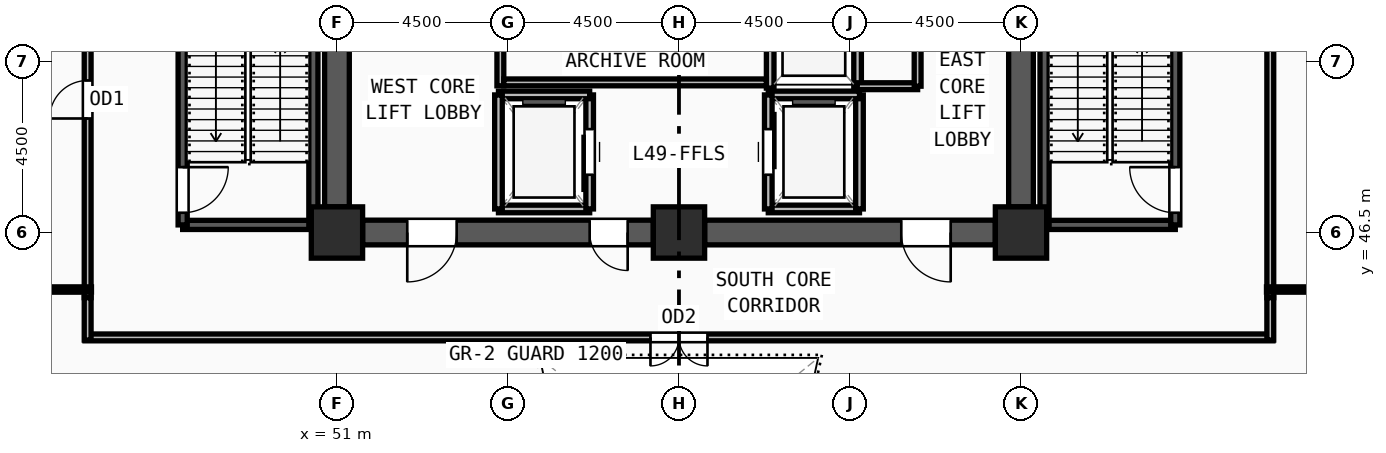
"""IFC4 building model, lengths in metres.
Left out: names, types, materials, properties, quantities, classifications, styles, units other than length and angle.
Written with IfcOpenShell. Run it as: python <this file> out.ifc"""

import sys

from ifc_helpers import new_model, si_unit, direction, frame, frame_2d, origin, origin_2d, place, context, subcontext, project, spatial, rectangle, extrude, source, transform, mapped, element, fill, save


model = new_model("IFC4")
c1 = context("Model", 3, precision=1e-05, world=origin(), true_north=direction((0.0, 1.0)))
c2 = subcontext(c1, "Body", "Model", "MODEL_VIEW")
j1 = project(units=[si_unit("LENGTHUNIT", "METRE"), si_unit("PLANEANGLEUNIT", "RADIAN")], contexts=[c1])
p1 = place(None, origin())
s1 = spatial("IfcSite", under=j1, at=p1, CompositionType="ELEMENT")
p2 = place(p1, origin())
s2 = spatial("IfcBuilding", under=s1, at=p2, CompositionType="ELEMENT")
p3 = place(p2, frame((0.0, 0.0, 189.75)))
s3 = spatial("IfcBuildingStorey", under=s2, at=p3, CompositionType="ELEMENT", Elevation=189.75)
m1 = source(origin(), c2, "Body", "SweptSolid", [
    extrude(rectangle(XDim=1.35, YDim=1.35, at=origin_2d()), origin(), (0.0, 0.0, 1.0), 4.5),
])
for number, where, z_axis, x_axis in (
    (1, (51.0, 46.5, 0.0), (0.0, 0.0, 1.0), (1.0, 0.0, 0.0)),
    (2, (60.0, 46.5, 0.0), (0.0, 0.0, 1.0), (1.0, 0.0, 0.0)),
    (3, (69.0, 46.5, 0.0), (0.0, 0.0, 1.0), (1.0, 0.0, 0.0)),
):
    element("IfcColumn", number, at=place(p3, frame(where, z_axis=z_axis, x_axis=x_axis)), inside=s3, PredefinedType="COLUMN", context=c2, shape_type="MappedRepresentation", body=[
        mapped(m1, transform((0.0, 0.0, 0.0), x_axis=(1.0, 0.0, 0.0), y_axis=(0.0, 1.0, 0.0), z_axis=(0.0, 0.0, 1.0), scale=1.0)),
    ])
p4 = place(p3, frame((37.541, 43.351, 0.0), z_axis=(0.0, 0.0, 1.0), x_axis=(0.551962660992, -0.833868827137, 0.0)))
e4 = element("IfcWall", 4, at=p4, inside=s3, PredefinedType="SOLIDWALL", context=c2, shape_type="SweptSolid", body=[
    extrude(rectangle(XDim=11.785, YDim=0.38, at=frame_2d((5.893, 0.0))), origin(), (0.0, 0.0, 1.0), 4.32),
])
p5 = place(p3, frame((69.0, 60.825, 0.0), z_axis=(0.0, 0.0, 1.0), x_axis=(0.0, -1.0, 0.0)))
e5 = element("IfcWall", 5, at=p5, inside=s3, PredefinedType="SHEAR", context=c2, shape_type="SweptSolid", body=[
    extrude(rectangle(XDim=13.65, YDim=0.65, at=frame_2d((6.825, 0.0))), origin(), (0.0, 0.0, 1.0), 4.32),
])
m2 = source(origin(), c2, "Body", "SweptSolid", [
    extrude(rectangle(XDim=1.2, YDim=2.2, at=frame_2d((0.6, 1.1))), frame((0.0, 0.335, 0.0), z_axis=(0.0, -1.0, 0.0), x_axis=(1.0, 0.0, 0.0)), (0.0, 0.0, 1.0), 0.67),
])
p6 = place(p5, frame((1.275, 0.0, 0.0)))
e6 = element("IfcOpeningElement", 6, at=p6, cuts=e5, PredefinedType="OPENING", context=c2, shape_type="MappedRepresentation", body=[
    mapped(m2, transform((0.0, 0.0, 0.0), x_axis=(1.0, 0.0, 0.0), y_axis=(0.0, 1.0, 0.0), z_axis=(0.0, 0.0, 1.0), scale=1.0)),
])
p7 = place(p3, frame((68.325, 46.5, 0.0), z_axis=(0.0, 0.0, 1.0), x_axis=(-1.0, 0.0, 0.0)))
e7 = element("IfcWall", 7, at=p7, inside=s3, PredefinedType="SHEAR", context=c2, shape_type="SweptSolid", body=[
    extrude(rectangle(XDim=7.65, YDim=0.65, at=frame_2d((3.825, 0.0))), origin(), (0.0, 0.0, 1.0), 4.32),
])
m3 = source(origin(), c2, "Body", "SweptSolid", [
    extrude(rectangle(XDim=1.3, YDim=2.2, at=frame_2d((0.65, 1.1))), frame((0.0, 0.335, 0.0), z_axis=(0.0, -1.0, 0.0), x_axis=(1.0, 0.0, 0.0)), (0.0, 0.0, 1.0), 0.67),
])
p8 = place(p7, frame((1.175, 0.0, 0.0)))
e8 = element("IfcOpeningElement", 8, at=p8, cuts=e7, PredefinedType="OPENING", context=c2, shape_type="MappedRepresentation", body=[
    mapped(m3, transform((0.0, 0.0, 0.0), x_axis=(1.0, 0.0, 0.0), y_axis=(0.0, 1.0, 0.0), z_axis=(0.0, 0.0, 1.0), scale=1.0)),
])
p9 = place(p3, frame((59.325, 46.5, 0.0), z_axis=(0.0, 0.0, 1.0), x_axis=(-1.0, 0.0, 0.0)))
e9 = element("IfcWall", 9, at=p9, inside=s3, PredefinedType="SHEAR", context=c2, shape_type="SweptSolid", body=[
    extrude(rectangle(XDim=7.65, YDim=0.65, at=frame_2d((3.825, 0.0))), origin(), (0.0, 0.0, 1.0), 4.32),
])
p10 = place(p9, frame((5.175, 0.0, 0.0)))
e10 = element("IfcOpeningElement", 10, at=p10, cuts=e9, PredefinedType="OPENING", context=c2, shape_type="MappedRepresentation", body=[
    mapped(m3, transform((0.0, 0.0, 0.0), x_axis=(1.0, 0.0, 0.0), y_axis=(0.0, 1.0, 0.0), z_axis=(0.0, 0.0, 1.0), scale=1.0)),
])
m4 = source(origin(), c2, "Body", "SweptSolid", [
    extrude(rectangle(XDim=1.0, YDim=2.2, at=frame_2d((0.5, 1.1))), frame((0.0, 0.335, 0.0), z_axis=(0.0, -1.0, 0.0), x_axis=(1.0, 0.0, 0.0)), (0.0, 0.0, 1.0), 0.67),
])
p11 = place(p9, frame((0.675, 0.0, 0.0)))
e11 = element("IfcOpeningElement", 11, at=p11, cuts=e9, PredefinedType="OPENING", context=c2, shape_type="MappedRepresentation", body=[
    mapped(m4, transform((0.0, 0.0, 0.0), x_axis=(1.0, 0.0, 0.0), y_axis=(0.0, 1.0, 0.0), z_axis=(0.0, 0.0, 1.0), scale=1.0)),
])
p12 = place(p3, frame((51.0, 47.175, 0.0), z_axis=(0.0, 0.0, 1.0), x_axis=(0.0, 1.0, 0.0)))
e12 = element("IfcWall", 12, at=p12, inside=s3, PredefinedType="SHEAR", context=c2, shape_type="SweptSolid", body=[
    extrude(rectangle(XDim=13.65, YDim=0.65, at=frame_2d((6.825, 0.0))), origin(), (0.0, 0.0, 1.0), 4.32),
])
m5 = source(origin(), c2, "Body", "SweptSolid", [
    extrude(rectangle(XDim=1.1, YDim=2.2, at=frame_2d((0.55, 1.1))), frame((0.0, 0.335, 0.0), z_axis=(0.0, -1.0, 0.0), x_axis=(1.0, 0.0, 0.0)), (0.0, 0.0, 1.0), 0.67),
])
p13 = place(p12, frame((11.725, 0.0, 0.0)))
e13 = element("IfcOpeningElement", 13, at=p13, cuts=e12, PredefinedType="OPENING", context=c2, shape_type="MappedRepresentation", body=[
    mapped(m5, transform((0.0, 0.0, 0.0), x_axis=(1.0, 0.0, 0.0), y_axis=(0.0, 1.0, 0.0), z_axis=(0.0, 0.0, 1.0), scale=1.0)),
])
p14 = place(p3, frame((46.94, 46.7, 0.0), z_axis=(0.0, 0.0, 1.0), x_axis=(1.0, 0.0, 0.0)))
e14 = element("IfcWall", 14, at=p14, inside=s3, PredefinedType="SOLIDWALL", context=c2, shape_type="SweptSolid", body=[
    extrude(rectangle(XDim=3.44, YDim=0.24, at=frame_2d((1.72, 0.0))), origin(), (0.0, 0.0, 1.0), 4.32),
])
p15 = place(p3, frame((50.38, 46.7, 0.0), z_axis=(0.0, 0.0, 1.0), x_axis=(0.0, 1.0, 0.0)))
e15 = element("IfcWall", 15, at=p15, inside=s3, PredefinedType="SOLIDWALL", context=c2, shape_type="SweptSolid", body=[
    extrude(rectangle(XDim=7.82, YDim=0.24, at=frame_2d((3.91, 0.0))), origin(), (0.0, 0.0, 1.0), 4.32),
])
p16 = place(p3, frame((46.94, 54.52, 0.0), z_axis=(0.0, 0.0, 1.0), x_axis=(0.0, -1.0, 0.0)))
e16 = element("IfcWall", 16, at=p16, inside=s3, PredefinedType="SOLIDWALL", context=c2, shape_type="SweptSolid", body=[
    extrude(rectangle(XDim=7.82, YDim=0.24, at=frame_2d((3.91, 0.0))), origin(), (0.0, 0.0, 1.0), 4.32),
])
m6 = source(origin(), c2, "Body", "SweptSolid", [
    extrude(rectangle(XDim=1.2, YDim=2.2, at=frame_2d((0.6, 1.1))), frame((0.0, 0.13, 0.0), z_axis=(0.0, -1.0, 0.0), x_axis=(1.0, 0.0, 0.0)), (0.0, 0.0, 1.0), 0.26),
])
p17 = place(p16, frame((6.3, 0.0, 0.0)))
e17 = element("IfcOpeningElement", 17, at=p17, cuts=e16, PredefinedType="OPENING", context=c2, shape_type="MappedRepresentation", body=[
    mapped(m6, transform((0.0, 0.0, 0.0), x_axis=(1.0, 0.0, 0.0), y_axis=(0.0, 1.0, 0.0), z_axis=(0.0, 0.0, 1.0), scale=1.0)),
])
p18 = place(p3, frame((69.62, 46.7, 0.0), z_axis=(0.0, 0.0, 1.0), x_axis=(1.0, 0.0, 0.0)))
e18 = element("IfcWall", 18, at=p18, inside=s3, PredefinedType="SOLIDWALL", context=c2, shape_type="SweptSolid", body=[
    extrude(rectangle(XDim=3.44, YDim=0.24, at=frame_2d((1.72, 0.0))), origin(), (0.0, 0.0, 1.0), 4.32),
])
p19 = place(p3, frame((73.06, 46.7, 0.0), z_axis=(0.0, 0.0, 1.0), x_axis=(0.0, 1.0, 0.0)))
e19 = element("IfcWall", 19, at=p19, inside=s3, PredefinedType="SOLIDWALL", context=c2, shape_type="SweptSolid", body=[
    extrude(rectangle(XDim=7.82, YDim=0.24, at=frame_2d((3.91, 0.0))), origin(), (0.0, 0.0, 1.0), 4.32),
])
p20 = place(p19, frame((0.32, 0.0, 0.0)))
e20 = element("IfcOpeningElement", 20, at=p20, cuts=e19, PredefinedType="OPENING", context=c2, shape_type="MappedRepresentation", body=[
    mapped(m6, transform((0.0, 0.0, 0.0), x_axis=(1.0, 0.0, 0.0), y_axis=(0.0, 1.0, 0.0), z_axis=(0.0, 0.0, 1.0), scale=1.0)),
])
p21 = place(p3, frame((69.62, 54.52, 0.0), z_axis=(0.0, 0.0, 1.0), x_axis=(0.0, -1.0, 0.0)))
e21 = element("IfcWall", 21, at=p21, inside=s3, PredefinedType="SOLIDWALL", context=c2, shape_type="SweptSolid", body=[
    extrude(rectangle(XDim=7.82, YDim=0.24, at=frame_2d((3.91, 0.0))), origin(), (0.0, 0.0, 1.0), 4.32),
])
p22 = place(p3, frame((55.25, 47.12, 0.0), z_axis=(0.0, 0.0, 1.0), x_axis=(1.0, 0.0, 0.0)))
e22 = element("IfcWall", 22, at=p22, inside=s3, PredefinedType="SOLIDWALL", context=c2, shape_type="SweptSolid", body=[
    extrude(rectangle(XDim=2.4, YDim=0.2, at=frame_2d((1.2, 0.0))), origin(), (0.0, 0.0, 1.0), 4.32),
])
p23 = place(p3, frame((57.65, 47.12, 0.0), z_axis=(0.0, 0.0, 1.0), x_axis=(0.0, 1.0, 0.0)))
e23 = element("IfcWall", 23, at=p23, inside=s3, PredefinedType="SOLIDWALL", context=c2, shape_type="SweptSolid", body=[
    extrude(rectangle(XDim=3.0, YDim=0.2, at=frame_2d((1.5, 0.0))), origin(), (0.0, 0.0, 1.0), 4.32),
])
m7 = source(origin(), c2, "Body", "SweptSolid", [
    extrude(rectangle(XDim=1.2, YDim=2.3, at=frame_2d((0.6, 1.15))), frame((0.0, 0.11, 0.0), z_axis=(0.0, -1.0, 0.0), x_axis=(1.0, 0.0, 0.0)), (0.0, 0.0, 1.0), 0.22),
])
p24 = place(p23, frame((0.9, 0.0, 0.0)))
e24 = element("IfcOpeningElement", 24, at=p24, cuts=e23, PredefinedType="OPENING", context=c2, shape_type="MappedRepresentation", body=[
    mapped(m7, transform((0.0, 0.0, 0.0), x_axis=(1.0, 0.0, 0.0), y_axis=(0.0, 1.0, 0.0), z_axis=(0.0, 0.0, 1.0), scale=1.0)),
])
p25 = place(p3, frame((57.65, 50.12, 0.0), z_axis=(0.0, 0.0, 1.0), x_axis=(-1.0, 0.0, 0.0)))
e25 = element("IfcWall", 25, at=p25, inside=s3, PredefinedType="SOLIDWALL", context=c2, shape_type="SweptSolid", body=[
    extrude(rectangle(XDim=2.4, YDim=0.2, at=frame_2d((1.2, 0.0))), origin(), (0.0, 0.0, 1.0), 4.32),
])
p26 = place(p3, frame((55.25, 50.12, 0.0), z_axis=(0.0, 0.0, 1.0), x_axis=(0.0, -1.0, 0.0)))
e26 = element("IfcWall", 26, at=p26, inside=s3, PredefinedType="SOLIDWALL", context=c2, shape_type="SweptSolid", body=[
    extrude(rectangle(XDim=3.0, YDim=0.2, at=frame_2d((1.5, 0.0))), origin(), (0.0, 0.0, 1.0), 4.32),
])
p27 = place(p3, frame((62.35, 47.12, 0.0), z_axis=(0.0, 0.0, 1.0), x_axis=(1.0, 0.0, 0.0)))
e27 = element("IfcWall", 27, at=p27, inside=s3, PredefinedType="SOLIDWALL", context=c2, shape_type="SweptSolid", body=[
    extrude(rectangle(XDim=2.4, YDim=0.2, at=frame_2d((1.2, 0.0))), origin(), (0.0, 0.0, 1.0), 4.32),
])
p28 = place(p3, frame((64.75, 47.12, 0.0), z_axis=(0.0, 0.0, 1.0), x_axis=(0.0, 1.0, 0.0)))
e28 = element("IfcWall", 28, at=p28, inside=s3, PredefinedType="SOLIDWALL", context=c2, shape_type="SweptSolid", body=[
    extrude(rectangle(XDim=3.0, YDim=0.2, at=frame_2d((1.5, 0.0))), origin(), (0.0, 0.0, 1.0), 4.32),
])
p29 = place(p3, frame((64.75, 50.12, 0.0), z_axis=(0.0, 0.0, 1.0), x_axis=(-1.0, 0.0, 0.0)))
e29 = element("IfcWall", 29, at=p29, inside=s3, PredefinedType="SOLIDWALL", context=c2, shape_type="SweptSolid", body=[
    extrude(rectangle(XDim=2.4, YDim=0.2, at=frame_2d((1.2, 0.0))), origin(), (0.0, 0.0, 1.0), 4.32),
])
p30 = place(p3, frame((62.35, 50.12, 0.0), z_axis=(0.0, 0.0, 1.0), x_axis=(0.0, -1.0, 0.0)))
e30 = element("IfcWall", 30, at=p30, inside=s3, PredefinedType="SOLIDWALL", context=c2, shape_type="SweptSolid", body=[
    extrude(rectangle(XDim=3.0, YDim=0.2, at=frame_2d((1.5, 0.0))), origin(), (0.0, 0.0, 1.0), 4.32),
])
p31 = place(p30, frame((0.9, 0.0, 0.0)))
e31 = element("IfcOpeningElement", 31, at=p31, cuts=e30, PredefinedType="OPENING", context=c2, shape_type="MappedRepresentation", body=[
    mapped(m7, transform((0.0, 0.0, 0.0), x_axis=(1.0, 0.0, 0.0), y_axis=(0.0, 1.0, 0.0), z_axis=(0.0, 0.0, 1.0), scale=1.0)),
])
for number, where, z_axis, x_axis in (
    (32, (64.7, 50.3, 0.0), (0.0, 0.0, 1.0), (0.0, 1.0, 0.0)),
    (33, (62.4, 52.9, 0.0), (0.0, 0.0, 1.0), (0.0, -1.0, 0.0)),
):
    element("IfcWall", number, at=place(p3, frame(where, z_axis=z_axis, x_axis=x_axis)), inside=s3, PredefinedType="SOLIDWALL", context=c2, shape_type="SweptSolid", body=[
        extrude(rectangle(XDim=2.6, YDim=0.2, at=frame_2d((1.3, 0.0))), origin(), (0.0, 0.0, 1.0), 4.32),
    ])
p32 = place(p3, frame((75.56, 65.715, 0.0), z_axis=(0.0, 0.0, 1.0), x_axis=(0.0, -1.0, 0.0)))
e34 = element("IfcWall", 34, at=p32, inside=s3, PredefinedType="PARTITIONING", context=c2, shape_type="SweptSolid", body=[
    extrude(rectangle(XDim=20.93, YDim=0.18, at=frame_2d((10.465, 0.0))), origin(), (0.0, 0.0, 1.0), 4.32),
])
m8 = source(origin(), c2, "Body", "SweptSolid", [
    extrude(rectangle(XDim=1.5, YDim=2.2, at=frame_2d((0.75, 1.1))), frame((0.0, 0.1, 0.0), z_axis=(0.0, -1.0, 0.0), x_axis=(1.0, 0.0, 0.0)), (0.0, 0.0, 1.0), 0.2),
])
p33 = place(p32, frame((9.715, 0.0, 0.0)))
e35 = element("IfcOpeningElement", 35, at=p33, cuts=e34, PredefinedType="OPENING", context=c2, shape_type="MappedRepresentation", body=[
    mapped(m8, transform((0.0, 0.0, 0.0), x_axis=(1.0, 0.0, 0.0), y_axis=(0.0, 1.0, 0.0), z_axis=(0.0, 0.0, 1.0), scale=1.0)),
])
p34 = place(p3, frame((44.44, 44.785, 0.0), z_axis=(0.0, 0.0, 1.0), x_axis=(0.0, 1.0, 0.0)))
e36 = element("IfcWall", 36, at=p34, inside=s3, PredefinedType="PARTITIONING", context=c2, shape_type="SweptSolid", body=[
    extrude(rectangle(XDim=10.43, YDim=0.18, at=frame_2d((5.215, 0.0))), origin(), (0.0, 0.0, 1.0), 3.955),
])
m9 = source(origin(), c2, "Body", "SweptSolid", [
    extrude(rectangle(XDim=1.0, YDim=2.2, at=frame_2d((0.5, 1.1))), frame((0.0, 0.1, 0.0), z_axis=(0.0, -1.0, 0.0), x_axis=(1.0, 0.0, 0.0)), (0.0, 0.0, 1.0), 0.2),
])
p35 = place(p34, frame((4.715, 0.0, 0.0)))
e37 = element("IfcOpeningElement", 37, at=p35, cuts=e36, PredefinedType="OPENING", context=c2, shape_type="MappedRepresentation", body=[
    mapped(m9, transform((0.0, 0.0, 0.0), x_axis=(1.0, 0.0, 0.0), y_axis=(0.0, 1.0, 0.0), z_axis=(0.0, 0.0, 1.0), scale=1.0)),
])
p36 = place(p3, frame((75.63, 43.74, 0.0), z_axis=(0.0, 0.0, 1.0), x_axis=(-1.0, 0.0, 0.0)))
e38 = element("IfcWall", 38, at=p36, inside=s3, PredefinedType="PARTITIONING", context=c2, shape_type="SweptSolid", body=[
    extrude(rectangle(XDim=31.26, YDim=0.18, at=frame_2d((15.63, 0.0))), origin(), (0.0, 0.0, 1.0), 4.32),
])
p37 = place(p36, frame((14.88, 0.0, 0.0)))
e39 = element("IfcOpeningElement", 39, at=p37, cuts=e38, PredefinedType="OPENING", context=c2, shape_type="MappedRepresentation", body=[
    mapped(m8, transform((0.0, 0.0, 0.0), x_axis=(1.0, 0.0, 0.0), y_axis=(0.0, 1.0, 0.0), z_axis=(0.0, 0.0, 1.0), scale=1.0)),
])
p38 = place(p3, frame((64.69, 50.35, 0.0), z_axis=(0.0, 0.0, 1.0), x_axis=(1.0, 0.0, 0.0)))
e40 = element("IfcWall", 40, at=p38, inside=s3, PredefinedType="PARTITIONING", context=c2, shape_type="SweptSolid", body=[
    extrude(rectangle(XDim=1.59, YDim=0.18, at=frame_2d((0.795, 0.0))), origin(), (0.0, 0.0, 1.0), 4.32),
])
p39 = place(p3, frame((66.28, 50.35, 0.0), z_axis=(0.0, 0.0, 1.0), x_axis=(0.0, 1.0, 0.0)))
e41 = element("IfcWall", 41, at=p39, inside=s3, PredefinedType="PARTITIONING", context=c2, shape_type="SweptSolid", body=[
    extrude(rectangle(XDim=2.57, YDim=0.18, at=frame_2d((1.285, 0.0))), origin(), (0.0, 0.0, 1.0), 4.32),
])
for number, where, z_axis, x_axis in (
    (42, (44.44, 43.67, 0.0), (0.0, 0.0, 1.0), (0.0, 1.0, 0.0)),
    (43, (75.56, 44.785, 0.0), (0.0, 0.0, 1.0), (0.0, -1.0, 0.0)),
):
    element("IfcWall", number, at=place(p3, frame(where, z_axis=z_axis, x_axis=x_axis)), inside=s3, PredefinedType="PARTITIONING", context=c2, shape_type="SweptSolid", body=[
        extrude(rectangle(XDim=1.115, YDim=0.18, at=frame_2d((0.558, 0.0))), origin(), (0.0, 0.0, 1.0), 4.32),
    ])
p40 = place(p3, frame((44.54, 45.0, 0.0), z_axis=(0.0, 0.0, 1.0), x_axis=(-1.0, 0.0, 0.0)))
e44 = element("IfcWall", 44, at=p40, inside=s3, PredefinedType="PARTITIONING", context=c2, shape_type="SweptSolid", body=[
    extrude(rectangle(XDim=8.587, YDim=0.14, at=frame_2d((4.293, 0.0))), origin(), (0.0, 0.0, 1.0), 4.32),
])
p41 = place(p3, frame((75.46, 45.0, 0.0), z_axis=(0.0, 0.0, 1.0), x_axis=(1.0, 0.0, 0.0)))
e45 = element("IfcWall", 45, at=p41, inside=s3, PredefinedType="PARTITIONING", context=c2, shape_type="SweptSolid", body=[
    extrude(rectangle(XDim=8.251, YDim=0.14, at=frame_2d((4.125, 0.0))), origin(), (0.0, 0.0, 1.0), 4.32),
])
p42 = place(p3, frame((55.3, 50.36, 0.0), z_axis=(0.0, 0.0, 1.0), x_axis=(0.0, 1.0, 0.0)))
e46 = element("IfcWall", 46, at=p42, inside=s3, PredefinedType="PARTITIONING", context=c2, shape_type="SweptSolid", body=[
    extrude(rectangle(XDim=2.65, YDim=0.18, at=frame_2d((1.325, 0.0))), origin(), (0.0, 0.0, 1.0), 4.32),
])
p43 = place(p3, frame((55.39, 50.45, 0.0), z_axis=(0.0, 0.0, 1.0), x_axis=(1.0, 0.0, 0.0)))
e47 = element("IfcWall", 47, at=p43, inside=s3, PredefinedType="PARTITIONING", context=c2, shape_type="SweptSolid", body=[
    extrude(rectangle(XDim=6.91, YDim=0.18, at=frame_2d((3.455, 0.0))), origin(), (0.0, 0.0, 1.0), 4.32),
])
m10 = source(origin(), c2, "Body", "SweptSolid", [
    extrude(rectangle(XDim=1.3, YDim=2.2, at=frame_2d((0.65, 1.1))), frame((0.0, 0.025, 0.0), z_axis=(0.0, -1.0, 0.0), x_axis=(1.0, 0.0, 0.0)), (0.0, 0.0, 1.0), 0.05),
])
p44 = place(p10, origin())
e48 = element("IfcDoor", 48, at=p44, inside=s3, OperationType="SINGLE_SWING_RIGHT", PredefinedType="DOOR", context=c2, shape_type="MappedRepresentation", body=[
    mapped(m10, transform((0.0, 0.0, 0.0), x_axis=(1.0, 0.0, 0.0), y_axis=(0.0, 1.0, 0.0), z_axis=(0.0, 0.0, 1.0), scale=1.0)),
])
fill(e10, e48)
m11 = source(origin(), c2, "Body", "SweptSolid", [
    extrude(rectangle(XDim=1.0, YDim=2.2, at=frame_2d((0.5, 1.1))), frame((0.0, 0.025, 0.0), z_axis=(0.0, -1.0, 0.0), x_axis=(1.0, 0.0, 0.0)), (0.0, 0.0, 1.0), 0.05),
])
p45 = place(p11, origin())
e49 = element("IfcDoor", 49, at=p45, inside=s3, OperationType="SINGLE_SWING_LEFT", PredefinedType="DOOR", context=c2, shape_type="MappedRepresentation", body=[
    mapped(m11, transform((0.0, 0.0, 0.0), x_axis=(1.0, 0.0, 0.0), y_axis=(0.0, 1.0, 0.0), z_axis=(0.0, 0.0, 1.0), scale=1.0)),
])
fill(e11, e49)
p46 = place(p8, origin())
e50 = element("IfcDoor", 50, at=p46, inside=s3, OperationType="SINGLE_SWING_LEFT", PredefinedType="DOOR", context=c2, shape_type="MappedRepresentation", body=[
    mapped(m10, transform((0.0, 0.0, 0.0), x_axis=(1.0, 0.0, 0.0), y_axis=(0.0, 1.0, 0.0), z_axis=(0.0, 0.0, 1.0), scale=1.0)),
])
fill(e8, e50)
m12 = source(origin(), c2, "Body", "SweptSolid", [
    extrude(rectangle(XDim=1.2, YDim=2.2, at=frame_2d((0.6, 1.1))), frame((0.0, 0.025, 0.0), z_axis=(0.0, -1.0, 0.0), x_axis=(1.0, 0.0, 0.0)), (0.0, 0.0, 1.0), 0.05),
])
p47 = place(p17, origin())
e51 = element("IfcDoor", 51, at=p47, inside=s3, OperationType="SINGLE_SWING_LEFT", PredefinedType="DOOR", context=c2, shape_type="MappedRepresentation", body=[
    mapped(m12, transform((0.0, 0.0, 0.0), x_axis=(1.0, 0.0, 0.0), y_axis=(0.0, 1.0, 0.0), z_axis=(0.0, 0.0, 1.0), scale=1.0)),
])
fill(e17, e51)
p48 = place(p20, origin())
e52 = element("IfcDoor", 52, at=p48, inside=s3, OperationType="SINGLE_SWING_RIGHT", PredefinedType="DOOR", context=c2, shape_type="MappedRepresentation", body=[
    mapped(m12, transform((0.0, 0.0, 0.0), x_axis=(1.0, 0.0, 0.0), y_axis=(0.0, 1.0, 0.0), z_axis=(0.0, 0.0, 1.0), scale=1.0)),
])
fill(e20, e52)
m13 = source(origin(), c2, "Body", "SweptSolid", [
    extrude(rectangle(XDim=1.2, YDim=2.3, at=frame_2d((0.6, 1.15))), frame((0.0, 0.025, 0.0), z_axis=(0.0, -1.0, 0.0), x_axis=(1.0, 0.0, 0.0)), (0.0, 0.0, 1.0), 0.05),
])
p49 = place(p24, origin())
e53 = element("IfcDoor", 53, at=p49, inside=s3, OperationType="SLIDING_TO_LEFT", PredefinedType="DOOR", context=c2, shape_type="MappedRepresentation", body=[
    mapped(m13, transform((0.0, 0.0, 0.0), x_axis=(1.0, 0.0, 0.0), y_axis=(0.0, 1.0, 0.0), z_axis=(0.0, 0.0, 1.0), scale=1.0)),
])
fill(e24, e53)
p50 = place(p31, origin())
e54 = element("IfcDoor", 54, at=p50, inside=s3, OperationType="SLIDING_TO_LEFT", PredefinedType="DOOR", context=c2, shape_type="MappedRepresentation", body=[
    mapped(m13, transform((0.0, 0.0, 0.0), x_axis=(1.0, 0.0, 0.0), y_axis=(0.0, 1.0, 0.0), z_axis=(0.0, 0.0, 1.0), scale=1.0)),
])
fill(e31, e54)
p51 = place(p35, origin())
e55 = element("IfcDoor", 55, at=p51, inside=s3, OperationType="SINGLE_SWING_LEFT", PredefinedType="DOOR", context=c2, shape_type="MappedRepresentation", body=[
    mapped(m11, transform((0.0, 0.0, 0.0), x_axis=(1.0, 0.0, 0.0), y_axis=(0.0, 1.0, 0.0), z_axis=(0.0, 0.0, 1.0), scale=1.0)),
])
fill(e37, e55)
m14 = source(origin(), c2, "Body", "SweptSolid", [
    extrude(rectangle(XDim=1.5, YDim=2.2, at=frame_2d((0.75, 1.1))), frame((0.0, 0.025, 0.0), z_axis=(0.0, -1.0, 0.0), x_axis=(1.0, 0.0, 0.0)), (0.0, 0.0, 1.0), 0.05),
])
p52 = place(p37, origin())
e56 = element("IfcDoor", 56, at=p52, inside=s3, OperationType="DOUBLE_DOOR_SINGLE_SWING", PredefinedType="DOOR", context=c2, shape_type="MappedRepresentation", body=[
    mapped(m14, transform((0.0, 0.0, 0.0), x_axis=(1.0, 0.0, 0.0), y_axis=(0.0, 1.0, 0.0), z_axis=(0.0, 0.0, 1.0), scale=1.0)),
])
fill(e39, e56)
save(model, sys.argv[1])
